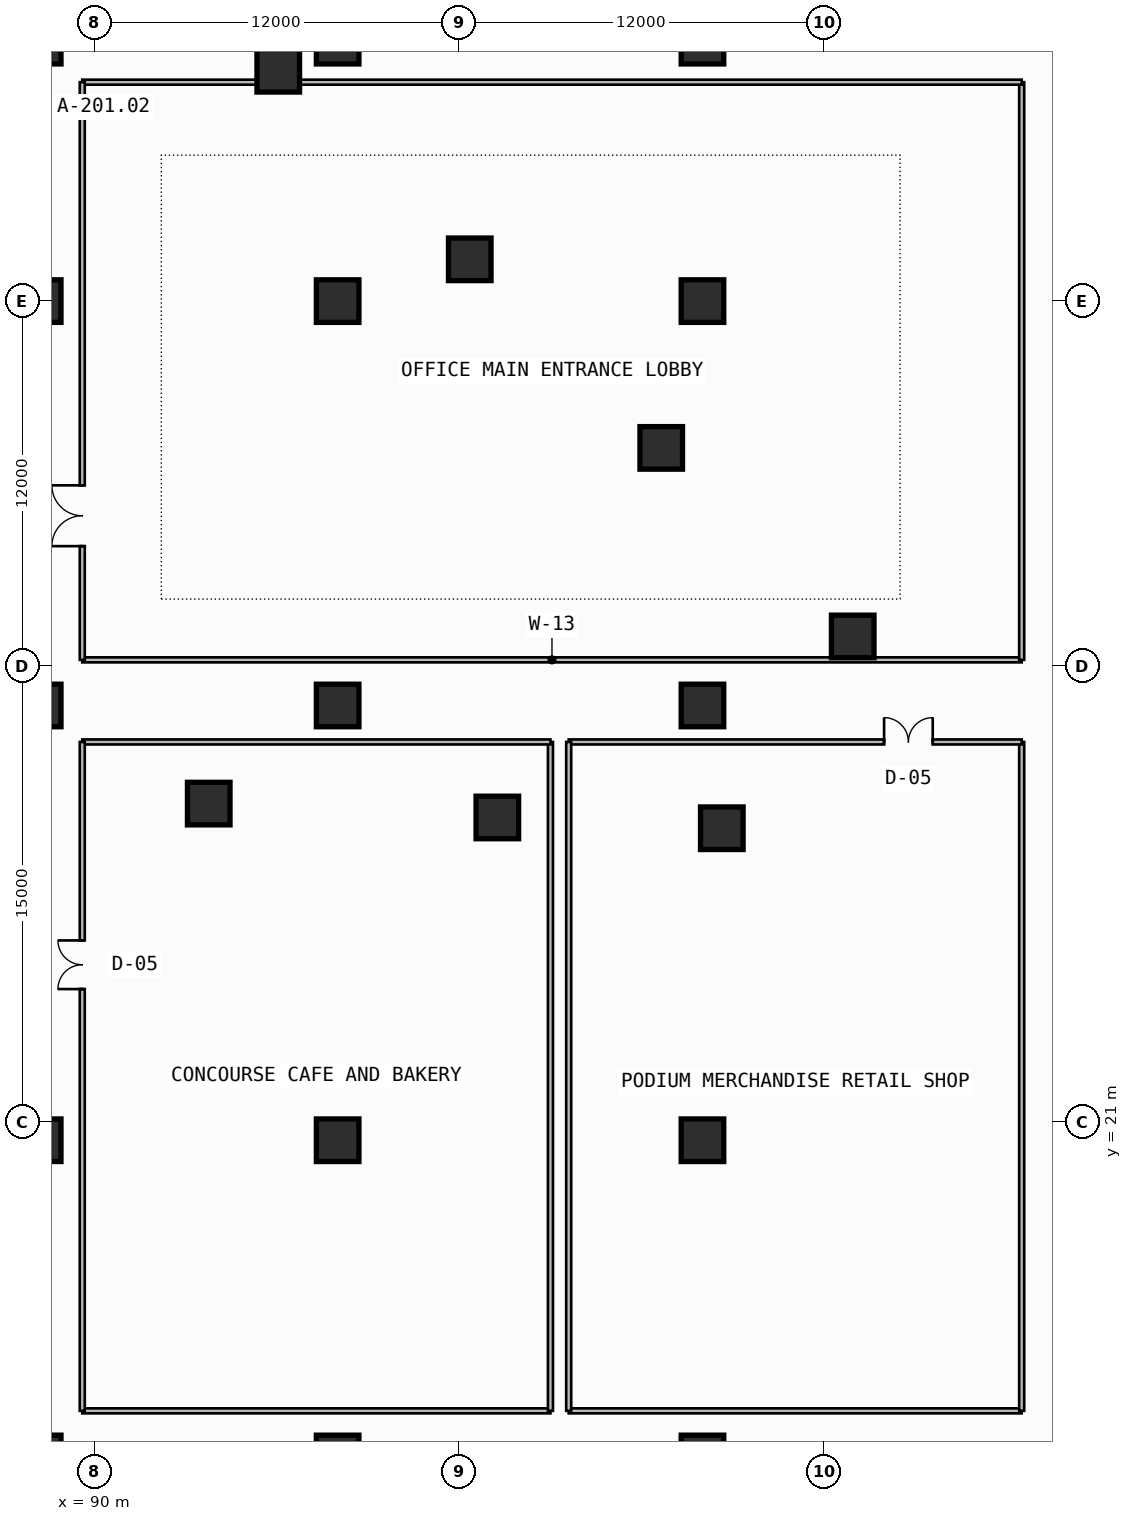
"""IFC4 building model, lengths in metres.
Left out: names, types, materials, properties, quantities, classifications, styles, units other than length and angle.
Written with IfcOpenShell. Run it as: python <this file> out.ifc"""

import sys

from ifc_helpers import new_model, si_unit, direction, frame, frame_2d, origin, origin_2d, place, context, subcontext, project, spatial, rectangle, extrude, element, fill, save


model = new_model("IFC4")
c1 = context("Model", 3, precision=1e-05, world=origin(), true_north=direction((0.0, 1.0)))
c2 = subcontext(c1, "Body", "Model", "MODEL_VIEW")
j1 = project(units=[si_unit("LENGTHUNIT", "METRE"), si_unit("PLANEANGLEUNIT", "RADIAN")], contexts=[c1])
p1 = place(None, origin())
s1 = spatial("IfcSite", under=j1, at=p1, CompositionType="ELEMENT")
p2 = place(p1, origin())
s2 = spatial("IfcBuilding", under=s1, at=p2, CompositionType="ELEMENT")
p3 = place(p2, origin())
s3 = spatial("IfcBuildingStorey", under=s2, at=p3, CompositionType="ELEMENT", Elevation=0.0)
for number, where, z_axis, x_axis in (
    (1, (88.2, 10.0, 0.0), (0.0, 0.0, 1.0), (1.0, 0.0, 0.0)),
    (2, (88.2, 20.4, 0.0), (0.0, 0.0, 1.0), (1.0, 0.0, 0.0)),
    (3, (88.2, 34.7, 0.0), (0.0, 0.0, 1.0), (1.0, 0.0, 0.0)),
    (4, (88.2, 48.0, 0.0), (0.0, 0.0, 1.0), (1.0, 0.0, 0.0)),
    (5, (88.2, 56.5, 0.0), (0.0, 0.0, 1.0), (1.0, 0.0, 0.0)),
    (6, (98.0, 10.0, 0.0), (0.0, 0.0, 1.0), (1.0, 0.0, 0.0)),
    (7, (98.0, 20.4, 0.0), (0.0, 0.0, 1.0), (1.0, 0.0, 0.0)),
    (8, (98.0, 34.7, 0.0), (0.0, 0.0, 1.0), (1.0, 0.0, 0.0)),
    (9, (98.0, 48.0, 0.0), (0.0, 0.0, 1.0), (1.0, 0.0, 0.0)),
    (10, (98.0, 56.5, 0.0), (0.0, 0.0, 1.0), (1.0, 0.0, 0.0)),
    (11, (110.0, 10.0, 0.0), (0.0, 0.0, 1.0), (1.0, 0.0, 0.0)),
    (12, (110.0, 20.4, 0.0), (0.0, 0.0, 1.0), (1.0, 0.0, 0.0)),
    (13, (110.0, 34.7, 0.0), (0.0, 0.0, 1.0), (1.0, 0.0, 0.0)),
    (14, (110.0, 48.0, 0.0), (0.0, 0.0, 1.0), (1.0, 0.0, 0.0)),
    (15, (110.0, 56.5, 0.0), (0.0, 0.0, 1.0), (1.0, 0.0, 0.0)),
    (16, (93.76, 31.472, 0.0), (0.0, 0.0, 1.0), (1.0, 0.0, 0.0)),
    (17, (103.253, 31.017, 0.0), (0.0, 0.0, 1.0), (1.0, 0.0, 0.0)),
    (18, (110.636, 30.662, 0.0), (0.0, 0.0, 1.0), (1.0, 0.0, 0.0)),
    (19, (114.942, 36.97, 0.0), (0.0, 0.0, 1.0), (1.0, 0.0, 0.0)),
    (20, (108.644, 43.172, 0.0), (0.0, 0.0, 1.0), (1.0, 0.0, 0.0)),
    (21, (102.345, 49.374, 0.0), (0.0, 0.0, 1.0), (1.0, 0.0, 0.0)),
    (22, (96.047, 55.576, 0.0), (0.0, 0.0, 1.0), (1.0, 0.0, 0.0)),
):
    element("IfcColumn", number, at=place(p3, frame(where, z_axis=z_axis, x_axis=x_axis)), inside=s3, PredefinedType="COLUMN", context=c2, shape_type="SweptSolid", body=[
        extrude(rectangle(XDim=1.4, YDim=1.4, at=origin_2d()), origin(), (0.0, 0.0, 1.0), 4.5),
    ])
p4 = place(p3, frame((89.6, 36.2, 0.0), z_axis=(0.0, 0.0, 1.0), x_axis=(1.0, 0.0, 0.0)))
e23 = element("IfcWall", 23, at=p4, inside=s3, PredefinedType="PARTITIONING", context=c2, shape_type="SweptSolid", body=[
    extrude(rectangle(XDim=30.9, YDim=0.165, at=frame_2d((15.45, 0.0))), origin(), (0.0, 0.0, 1.0), 3.465),
])
p5 = place(p3, frame((120.5, 36.2, 0.0), z_axis=(0.0, 0.0, 1.0), x_axis=(0.0, 1.0, 0.0)))
e24 = element("IfcWall", 24, at=p5, inside=s3, PredefinedType="PARTITIONING", context=c2, shape_type="SweptSolid", body=[
    extrude(rectangle(XDim=19.0, YDim=0.165, at=frame_2d((9.5, 0.0))), origin(), (0.0, 0.0, 1.0), 3.465),
])
p6 = place(p3, frame((120.5, 55.2, 0.0), z_axis=(0.0, 0.0, 1.0), x_axis=(-1.0, 0.0, 0.0)))
e25 = element("IfcWall", 25, at=p6, inside=s3, PredefinedType="PARTITIONING", context=c2, shape_type="SweptSolid", body=[
    extrude(rectangle(XDim=30.9, YDim=0.165, at=frame_2d((15.45, 0.0))), origin(), (0.0, 0.0, 1.0), 3.465),
])
p7 = place(p3, frame((89.6, 55.2, 0.0), z_axis=(0.0, 0.0, 1.0), x_axis=(0.0, -1.0, 0.0)))
e26 = element("IfcWall", 26, at=p7, inside=s3, PredefinedType="PARTITIONING", context=c2, shape_type="SweptSolid", body=[
    extrude(rectangle(XDim=19.0, YDim=0.165, at=frame_2d((9.5, 0.0))), origin(), (0.0, 0.0, 1.0), 3.465),
])
p8 = place(p7, frame((13.26, 0.0, 0.0)))
e27 = element("IfcOpeningElement", 27, at=p8, cuts=e26, PredefinedType="OPENING", context=c2, shape_type="SweptSolid", body=[
    extrude(rectangle(XDim=2.0, YDim=2.6, at=frame_2d((1.0, 1.3))), frame((0.0, 0.093, 0.0), z_axis=(0.0, -1.0, 0.0), x_axis=(1.0, 0.0, 0.0)), (0.0, 0.0, 1.0), 0.185),
])
p9 = place(p3, frame((89.6, 11.5, 0.0), z_axis=(0.0, 0.0, 1.0), x_axis=(1.0, 0.0, 0.0)))
e28 = element("IfcWall", 28, at=p9, inside=s3, PredefinedType="PARTITIONING", context=c2, shape_type="SweptSolid", body=[
    extrude(rectangle(XDim=15.4, YDim=0.165, at=frame_2d((7.7, 0.0))), origin(), (0.0, 0.0, 1.0), 3.465),
])
p10 = place(p3, frame((105.0, 11.5, 0.0), z_axis=(0.0, 0.0, 1.0), x_axis=(0.0, 1.0, 0.0)))
e29 = element("IfcWall", 29, at=p10, inside=s3, PredefinedType="PARTITIONING", context=c2, shape_type="SweptSolid", body=[
    extrude(rectangle(XDim=22.0, YDim=0.165, at=frame_2d((11.0, 0.0))), origin(), (0.0, 0.0, 1.0), 3.465),
])
p11 = place(p3, frame((105.0, 33.5, 0.0), z_axis=(0.0, 0.0, 1.0), x_axis=(-1.0, 0.0, 0.0)))
e30 = element("IfcWall", 30, at=p11, inside=s3, PredefinedType="PARTITIONING", context=c2, shape_type="SweptSolid", body=[
    extrude(rectangle(XDim=15.4, YDim=0.165, at=frame_2d((7.7, 0.0))), origin(), (0.0, 0.0, 1.0), 3.465),
])
p12 = place(p3, frame((89.6, 33.5, 0.0), z_axis=(0.0, 0.0, 1.0), x_axis=(0.0, -1.0, 0.0)))
e31 = element("IfcWall", 31, at=p12, inside=s3, PredefinedType="PARTITIONING", context=c2, shape_type="SweptSolid", body=[
    extrude(rectangle(XDim=22.0, YDim=0.165, at=frame_2d((11.0, 0.0))), origin(), (0.0, 0.0, 1.0), 3.465),
])
p13 = place(p12, frame((6.528, 0.0, 0.0)))
e32 = element("IfcOpeningElement", 32, at=p13, cuts=e31, PredefinedType="OPENING", context=c2, shape_type="SweptSolid", body=[
    extrude(rectangle(XDim=1.6, YDim=2.3, at=frame_2d((0.8, 1.15))), frame((0.0, 0.093, 0.0), z_axis=(0.0, -1.0, 0.0), x_axis=(1.0, 0.0, 0.0)), (0.0, 0.0, 1.0), 0.185),
])
p14 = place(p3, frame((105.6, 11.5, 0.0), z_axis=(0.0, 0.0, 1.0), x_axis=(1.0, 0.0, 0.0)))
e33 = element("IfcWall", 33, at=p14, inside=s3, PredefinedType="PARTITIONING", context=c2, shape_type="SweptSolid", body=[
    extrude(rectangle(XDim=14.9, YDim=0.165, at=frame_2d((7.45, 0.0))), origin(), (0.0, 0.0, 1.0), 3.465),
])
p15 = place(p3, frame((120.5, 11.5, 0.0), z_axis=(0.0, 0.0, 1.0), x_axis=(0.0, 1.0, 0.0)))
e34 = element("IfcWall", 34, at=p15, inside=s3, PredefinedType="PARTITIONING", context=c2, shape_type="SweptSolid", body=[
    extrude(rectangle(XDim=22.0, YDim=0.165, at=frame_2d((11.0, 0.0))), origin(), (0.0, 0.0, 1.0), 3.465),
])
p16 = place(p3, frame((120.5, 33.5, 0.0), z_axis=(0.0, 0.0, 1.0), x_axis=(-1.0, 0.0, 0.0)))
e35 = element("IfcWall", 35, at=p16, inside=s3, PredefinedType="PARTITIONING", context=c2, shape_type="SweptSolid", body=[
    extrude(rectangle(XDim=14.9, YDim=0.165, at=frame_2d((7.45, 0.0))), origin(), (0.0, 0.0, 1.0), 3.465),
])
p17 = place(p16, frame((2.926, 0.0, 0.0)))
e36 = element("IfcOpeningElement", 36, at=p17, cuts=e35, PredefinedType="OPENING", context=c2, shape_type="SweptSolid", body=[
    extrude(rectangle(XDim=1.6, YDim=2.3, at=frame_2d((0.8, 1.15))), frame((0.0, 0.093, 0.0), z_axis=(0.0, -1.0, 0.0), x_axis=(1.0, 0.0, 0.0)), (0.0, 0.0, 1.0), 0.185),
])
p18 = place(p3, frame((105.6, 33.5, 0.0), z_axis=(0.0, 0.0, 1.0), x_axis=(0.0, -1.0, 0.0)))
e37 = element("IfcWall", 37, at=p18, inside=s3, PredefinedType="PARTITIONING", context=c2, shape_type="SweptSolid", body=[
    extrude(rectangle(XDim=22.0, YDim=0.165, at=frame_2d((11.0, 0.0))), origin(), (0.0, 0.0, 1.0), 3.465),
])
p19 = place(p8, frame((2.0, 0.0, 0.0), z_axis=(0.0, 0.0, 1.0), x_axis=(-1.0, 0.0, 0.0)))
e38 = element("IfcDoor", 38, at=p19, inside=s3, OperationType="DOUBLE_DOOR_SINGLE_SWING", PredefinedType="DOOR", context=c2, shape_type="SweptSolid", body=[
    extrude(rectangle(XDim=2.0, YDim=2.6, at=frame_2d((1.0, 1.3))), frame((0.0, 0.025, 0.0), z_axis=(0.0, -1.0, 0.0), x_axis=(1.0, 0.0, 0.0)), (0.0, 0.0, 1.0), 0.05),
])
fill(e27, e38)
p20 = place(p13, frame((1.6, 0.0, 0.0), z_axis=(0.0, 0.0, 1.0), x_axis=(-1.0, 0.0, 0.0)))
e39 = element("IfcDoor", 39, at=p20, inside=s3, OperationType="DOUBLE_DOOR_SINGLE_SWING", PredefinedType="DOOR", context=c2, shape_type="SweptSolid", body=[
    extrude(rectangle(XDim=1.6, YDim=2.3, at=frame_2d((0.8, 1.15))), frame((0.0, 0.025, 0.0), z_axis=(0.0, -1.0, 0.0), x_axis=(1.0, 0.0, 0.0)), (0.0, 0.0, 1.0), 0.05),
])
fill(e32, e39)
p21 = place(p17, frame((1.6, 0.0, 0.0), z_axis=(0.0, 0.0, 1.0), x_axis=(-1.0, 0.0, 0.0)))
e40 = element("IfcDoor", 40, at=p21, inside=s3, OperationType="DOUBLE_DOOR_SINGLE_SWING", PredefinedType="DOOR", context=c2, shape_type="SweptSolid", body=[
    extrude(rectangle(XDim=1.6, YDim=2.3, at=frame_2d((0.8, 1.15))), frame((0.0, 0.025, 0.0), z_axis=(0.0, -1.0, 0.0), x_axis=(1.0, 0.0, 0.0)), (0.0, 0.0, 1.0), 0.05),
])
fill(e36, e40)
save(model, sys.argv[1])
